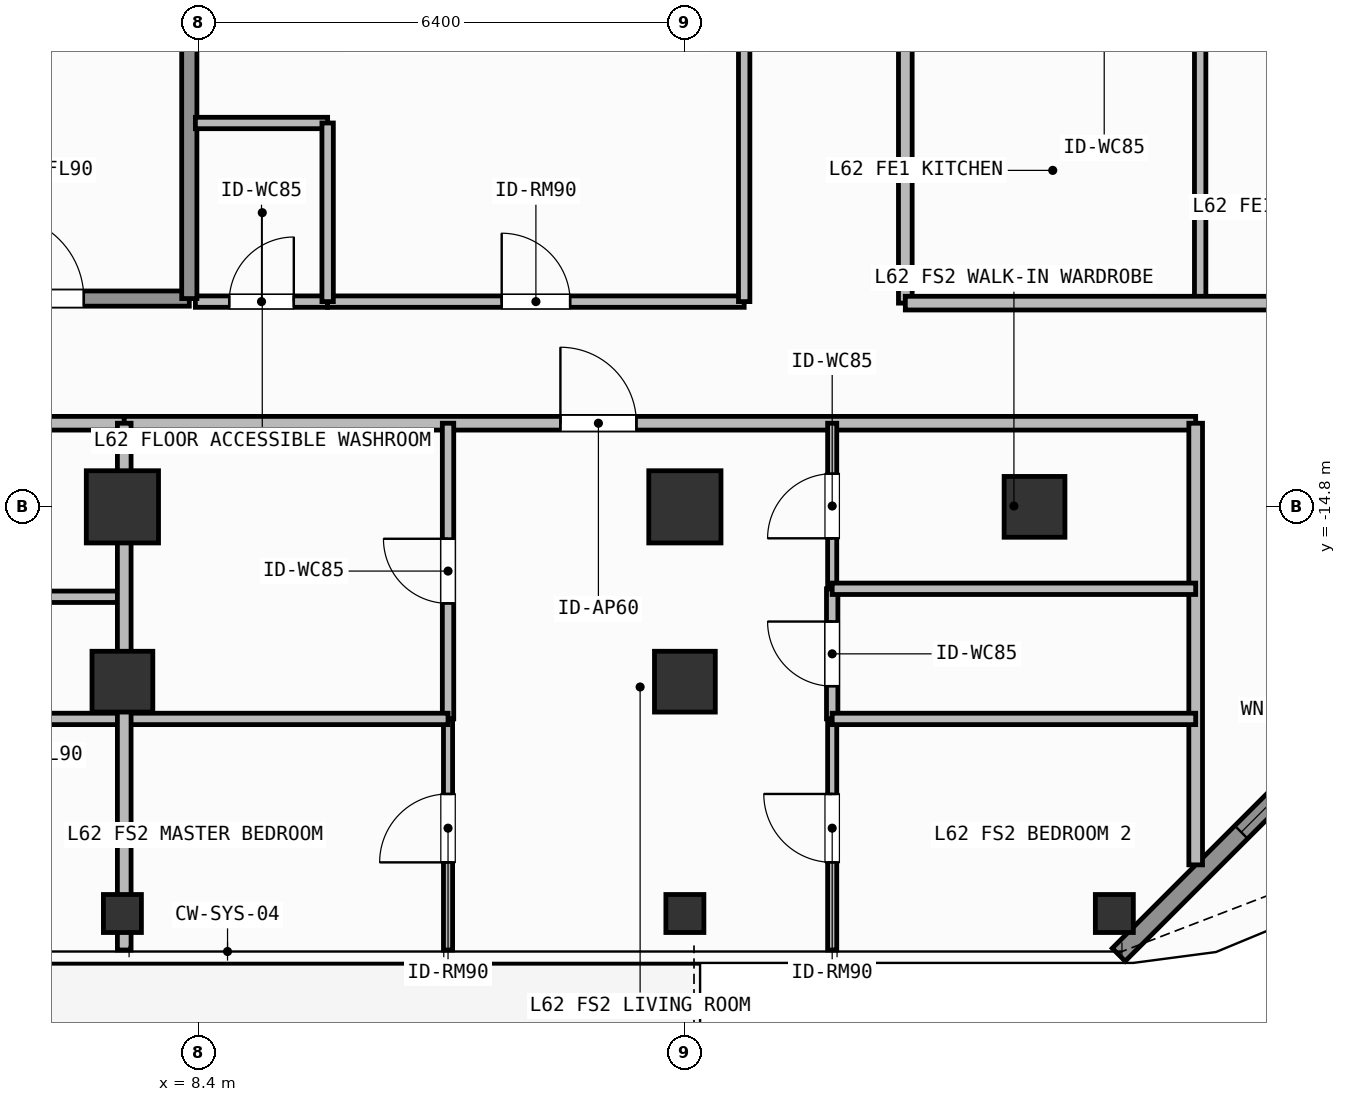
"""IFC4 building model, lengths in metres.
Left out: names, types, materials, properties, quantities, classifications, styles, units other than length and angle.
Written with IfcOpenShell. Run it as: python <this file> out.ifc"""

import sys

from ifc_helpers import new_model, si_unit, direction, frame, frame_2d, origin, origin_2d, place, context, subcontext, project, spatial, rectangle, hollow_rectangle, extrude, element, fill, save


model = new_model("IFC4")
c1 = context("Model", 3, precision=1e-05, world=origin(), true_north=direction((0.0, 1.0)))
c2 = subcontext(c1, "Body", "Model", "MODEL_VIEW")
j1 = project(units=[si_unit("LENGTHUNIT", "METRE"), si_unit("PLANEANGLEUNIT", "RADIAN")], contexts=[c1])
p1 = place(None, origin())
s1 = spatial("IfcSite", under=j1, at=p1, CompositionType="ELEMENT")
p2 = place(p1, origin())
s2 = spatial("IfcBuilding", under=s1, at=p2, CompositionType="ELEMENT")
p3 = place(p2, frame((0.0, 0.0, 254.7)))
s3 = spatial("IfcBuildingStorey", under=s2, at=p3, CompositionType="ELEMENT", Elevation=254.7)
for number, where, z_axis, x_axis in (
    (1, (7.4, -14.8, 0.0), (0.0, 0.0, 1.0), (1.0, 0.0, 0.0)),
    (2, (14.8, -14.8, 0.0), (0.0, 0.0, 1.0), (1.0, 0.0, 0.0)),
):
    element("IfcColumn", number, at=place(p3, frame(where, z_axis=z_axis, x_axis=x_axis)), inside=s3, PredefinedType="COLUMN", context=c2, shape_type="SweptSolid", body=[
        extrude(rectangle(XDim=0.95, YDim=0.95, at=origin_2d()), origin(), (0.0, 0.0, 1.0), 3.9),
    ])
for number, where, z_axis, x_axis in (
    (3, (19.4, -14.8, 0.0), (0.0, 0.0, 1.0), (1.0, 0.0, 0.0)),
    (4, (7.4, -17.1, 0.0), (0.0, 0.0, 1.0), (1.0, 0.0, 0.0)),
    (5, (14.8, -17.1, 0.0), (0.0, 0.0, 1.0), (1.0, 0.0, 0.0)),
):
    element("IfcColumn", number, at=place(p3, frame(where, z_axis=z_axis, x_axis=x_axis)), inside=s3, PredefinedType="COLUMN", context=c2, shape_type="SweptSolid", body=[
        extrude(hollow_rectangle(XDim=0.8, YDim=0.8, WallThickness=0.036, at=origin_2d()), origin(), (0.0, 0.0, 1.0), 3.9),
    ])
for number, where, z_axis, x_axis in (
    (6, (20.45, -20.15, 0.0), (0.0, 0.0, 1.0), (1.0, 0.0, 0.0)),
    (7, (7.4, -20.15, 0.0), (0.0, 0.0, 1.0), (1.0, 0.0, 0.0)),
    (8, (14.8, -20.15, 0.0), (0.0, 0.0, 1.0), (1.0, 0.0, 0.0)),
):
    element("IfcColumn", number, at=place(p3, frame(where, z_axis=z_axis, x_axis=x_axis)), inside=s3, PredefinedType="COLUMN", context=c2, shape_type="SweptSolid", body=[
        extrude(hollow_rectangle(XDim=0.5, YDim=0.5, WallThickness=0.025, at=origin_2d()), origin(), (0.0, 0.0, 1.0), 3.9),
    ])
p4 = place(p3, frame((24.792, -16.408, 0.0), z_axis=(0.0, 0.0, 1.0), x_axis=(-0.707126925818, -0.707086635981, 0.0)))
e9 = element("IfcWall", 9, at=p4, inside=s3, PredefinedType="SOLIDWALL", context=c2, shape_type="SweptSolid", body=[
    extrude(rectangle(XDim=6.06, YDim=0.24, at=frame_2d((3.03, 0.0))), origin(), (0.0, 0.0, 1.0), 3.68),
])
p5 = place(p4, frame((2.28, 0.0, 0.8)))
e10 = element("IfcOpeningElement", 10, at=p5, cuts=e9, PredefinedType="OPENING", context=c2, shape_type="SweptSolid", body=[
    extrude(rectangle(XDim=1.5, YDim=1.85, at=frame_2d((0.75, 0.925))), frame((0.0, 0.13, 0.0), z_axis=(0.0, -1.0, 0.0), x_axis=(1.0, 0.0, 0.0)), (0.0, 0.0, 1.0), 0.26),
])
p6 = place(p3, frame((4.58, -12.06, 0.0), z_axis=(0.0, 0.0, 1.0), x_axis=(1.0, 0.0, 0.0)))
e11 = element("IfcWall", 11, at=p6, inside=s3, PredefinedType="SOLIDWALL", context=c2, shape_type="SweptSolid", body=[
    extrude(rectangle(XDim=3.7, YDim=0.2, at=frame_2d((1.85, 0.0))), origin(), (0.0, 0.0, 1.0), 3.68),
])
p7 = place(p6, frame((1.212, 0.0, 0.0)))
e12 = element("IfcOpeningElement", 12, at=p7, cuts=e11, PredefinedType="OPENING", context=c2, shape_type="SweptSolid", body=[
    extrude(rectangle(XDim=1.1, YDim=2.15, at=frame_2d((0.55, 1.075))), frame((0.0, 0.11, 0.0), z_axis=(0.0, -1.0, 0.0), x_axis=(1.0, 0.0, 0.0)), (0.0, 0.0, 1.0), 0.22),
])
p8 = place(p3, frame((8.36, -12.1, 0.0), z_axis=(0.0, 0.0, 1.0), x_axis=(1.0, 0.0, 0.0)))
e13 = element("IfcWall", 13, at=p8, inside=s3, PredefinedType="PARTITIONING", context=c2, shape_type="SweptSolid", body=[
    extrude(rectangle(XDim=1.74, YDim=0.15, at=frame_2d((0.87, 0.0))), origin(), (0.0, 0.0, 1.0), 3.68),
])
p9 = place(p8, frame((0.445, 0.0, 0.0)))
e14 = element("IfcOpeningElement", 14, at=p9, cuts=e13, PredefinedType="OPENING", context=c2, shape_type="SweptSolid", body=[
    extrude(rectangle(XDim=0.85, YDim=2.1, at=frame_2d((0.425, 1.05))), frame((0.0, 0.085, 0.0), z_axis=(0.0, -1.0, 0.0), x_axis=(1.0, 0.0, 0.0)), (0.0, 0.0, 1.0), 0.17),
])
p10 = place(p3, frame((10.1, -12.1, 0.0), z_axis=(0.0, 0.0, 1.0), x_axis=(1.0, 0.0, 0.0)))
e15 = element("IfcWall", 15, at=p10, inside=s3, PredefinedType="PARTITIONING", context=c2, shape_type="SweptSolid", body=[
    extrude(rectangle(XDim=5.48, YDim=0.15, at=frame_2d((2.74, 0.0))), origin(), (0.0, 0.0, 1.0), 3.68),
])
p11 = place(p10, frame((2.29, 0.0, 0.0)))
e16 = element("IfcOpeningElement", 16, at=p11, cuts=e15, PredefinedType="OPENING", context=c2, shape_type="SweptSolid", body=[
    extrude(rectangle(XDim=0.9, YDim=2.1, at=frame_2d((0.45, 1.05))), frame((0.0, 0.085, 0.0), z_axis=(0.0, -1.0, 0.0), x_axis=(1.0, 0.0, 0.0)), (0.0, 0.0, 1.0), 0.17),
])
p12 = place(p3, frame((-13.72, -13.7, 0.0), z_axis=(0.0, 0.0, 1.0), x_axis=(1.0, 0.0, 0.0)))
e17 = element("IfcWall", 17, at=p12, inside=s3, PredefinedType="PARTITIONING", context=c2, shape_type="SweptSolid", body=[
    extrude(rectangle(XDim=21.144, YDim=0.18, at=frame_2d((10.572, 0.0))), origin(), (0.0, 0.0, 1.0), 3.68),
])
p13 = place(p12, frame((9.625, 0.0, 0.0)))
e18 = element("IfcOpeningElement", 18, at=p13, cuts=e17, PredefinedType="OPENING", context=c2, shape_type="SweptSolid", body=[
    extrude(rectangle(XDim=1.0, YDim=2.2, at=frame_2d((0.5, 1.1))), frame((0.0, 0.1, 0.0), z_axis=(0.0, -1.0, 0.0), x_axis=(1.0, 0.0, 0.0)), (0.0, 0.0, 1.0), 0.2),
])
p14 = place(p3, frame((7.424, -13.7, 0.0), z_axis=(0.0, 0.0, 1.0), x_axis=(1.0, 0.0, 0.0)))
e19 = element("IfcWall", 19, at=p14, inside=s3, PredefinedType="PARTITIONING", context=c2, shape_type="SweptSolid", body=[
    extrude(rectangle(XDim=14.096, YDim=0.18, at=frame_2d((7.048, 0.0))), origin(), (0.0, 0.0, 1.0), 3.68),
])
p15 = place(p14, frame((5.738, 0.0, 0.0)))
e20 = element("IfcOpeningElement", 20, at=p15, cuts=e19, PredefinedType="OPENING", context=c2, shape_type="SweptSolid", body=[
    extrude(rectangle(XDim=1.0, YDim=2.2, at=frame_2d((0.5, 1.1))), frame((0.0, 0.1, 0.0), z_axis=(0.0, -1.0, 0.0), x_axis=(1.0, 0.0, 0.0)), (0.0, 0.0, 1.0), 0.2),
])
p16 = place(p3, frame((11.684, -17.59, 0.0), z_axis=(0.0, 0.0, 1.0), x_axis=(0.0, 1.0, 0.0)))
e21 = element("IfcWall", 21, at=p16, inside=s3, PredefinedType="PARTITIONING", context=c2, shape_type="SweptSolid", body=[
    extrude(rectangle(XDim=3.89, YDim=0.15, at=frame_2d((1.945, 0.0))), origin(), (0.0, 0.0, 1.0), 3.68),
])
p17 = place(p16, frame((1.52, 0.0, 0.0)))
e22 = element("IfcOpeningElement", 22, at=p17, cuts=e21, PredefinedType="OPENING", context=c2, shape_type="SweptSolid", body=[
    extrude(rectangle(XDim=0.85, YDim=2.1, at=frame_2d((0.425, 1.05))), frame((0.0, 0.085, 0.0), z_axis=(0.0, -1.0, 0.0), x_axis=(1.0, 0.0, 0.0)), (0.0, 0.0, 1.0), 0.17),
])
p18 = place(p3, frame((11.684, -20.63, 0.0), z_axis=(0.0, 0.0, 1.0), x_axis=(0.0, 1.0, 0.0)))
e23 = element("IfcWall", 23, at=p18, inside=s3, PredefinedType="PARTITIONING", context=c2, shape_type="SweptSolid", body=[
    extrude(rectangle(XDim=3.04, YDim=0.12, at=frame_2d((1.52, 0.0))), origin(), (0.0, 0.0, 1.0), 3.68),
])
p19 = place(p18, frame((1.153, 0.0, 0.0)))
e24 = element("IfcOpeningElement", 24, at=p19, cuts=e23, PredefinedType="OPENING", context=c2, shape_type="SweptSolid", body=[
    extrude(rectangle(XDim=0.9, YDim=2.1, at=frame_2d((0.45, 1.05))), frame((0.0, 0.07, 0.0), z_axis=(0.0, -1.0, 0.0), x_axis=(1.0, 0.0, 0.0)), (0.0, 0.0, 1.0), 0.14),
])
p20 = place(p3, frame((16.738, -17.59, 0.0), z_axis=(0.0, 0.0, 1.0), x_axis=(0.0, 1.0, 0.0)))
e25 = element("IfcWall", 25, at=p20, inside=s3, PredefinedType="PARTITIONING", context=c2, shape_type="SweptSolid", body=[
    extrude(rectangle(XDim=1.712, YDim=0.15, at=frame_2d((0.856, 0.0))), origin(), (0.0, 0.0, 1.0), 3.68),
])
p21 = place(p20, frame((0.431, 0.0, 0.0)))
e26 = element("IfcOpeningElement", 26, at=p21, cuts=e25, PredefinedType="OPENING", context=c2, shape_type="SweptSolid", body=[
    extrude(rectangle(XDim=0.85, YDim=2.1, at=frame_2d((0.425, 1.05))), frame((0.0, 0.085, 0.0), z_axis=(0.0, -1.0, 0.0), x_axis=(1.0, 0.0, 0.0)), (0.0, 0.0, 1.0), 0.17),
])
p22 = place(p3, frame((16.738, -15.878, 0.0), z_axis=(0.0, 0.0, 1.0), x_axis=(0.0, 1.0, 0.0)))
e27 = element("IfcWall", 27, at=p22, inside=s3, PredefinedType="PARTITIONING", context=c2, shape_type="SweptSolid", body=[
    extrude(rectangle(XDim=2.178, YDim=0.12, at=frame_2d((1.089, 0.0))), origin(), (0.0, 0.0, 1.0), 3.68),
])
p23 = place(p22, frame((0.664, 0.0, 0.0)))
e28 = element("IfcOpeningElement", 28, at=p23, cuts=e27, PredefinedType="OPENING", context=c2, shape_type="SweptSolid", body=[
    extrude(rectangle(XDim=0.85, YDim=2.1, at=frame_2d((0.425, 1.05))), frame((0.0, 0.07, 0.0), z_axis=(0.0, -1.0, 0.0), x_axis=(1.0, 0.0, 0.0)), (0.0, 0.0, 1.0), 0.14),
])
p24 = place(p3, frame((16.738, -20.63, 0.0), z_axis=(0.0, 0.0, 1.0), x_axis=(0.0, 1.0, 0.0)))
e29 = element("IfcWall", 29, at=p24, inside=s3, PredefinedType="PARTITIONING", context=c2, shape_type="SweptSolid", body=[
    extrude(rectangle(XDim=3.04, YDim=0.12, at=frame_2d((1.52, 0.0))), origin(), (0.0, 0.0, 1.0), 3.68),
])
p25 = place(p24, frame((1.153, 0.0, 0.0)))
e30 = element("IfcOpeningElement", 30, at=p25, cuts=e29, PredefinedType="OPENING", context=c2, shape_type="SweptSolid", body=[
    extrude(rectangle(XDim=0.9, YDim=2.1, at=frame_2d((0.45, 1.05))), frame((0.0, 0.07, 0.0), z_axis=(0.0, -1.0, 0.0), x_axis=(1.0, 0.0, 0.0)), (0.0, 0.0, 1.0), 0.14),
])
p26 = place(p3, frame((17.7, -12.12, 0.0), z_axis=(0.0, 0.0, 1.0), x_axis=(0.0, 1.0, 0.0)))
e31 = element("IfcWall", 31, at=p26, inside=s3, PredefinedType="PARTITIONING", context=c2, shape_type="SweptSolid", body=[
    extrude(rectangle(XDim=13.574, YDim=0.18, at=frame_2d((6.787, 0.0))), origin(), (0.0, 0.0, 1.0), 3.68),
])
p27 = place(p26, frame((5.665, 0.0, 0.0)))
e32 = element("IfcOpeningElement", 32, at=p27, cuts=e31, PredefinedType="OPENING", context=c2, shape_type="SweptSolid", body=[
    extrude(rectangle(XDim=1.0, YDim=2.2, at=frame_2d((0.5, 1.1))), frame((0.0, 0.1, 0.0), z_axis=(0.0, -1.0, 0.0), x_axis=(1.0, 0.0, 0.0)), (0.0, 0.0, 1.0), 0.2),
])
p28 = place(p3, frame((8.28, -12.06, 0.0), z_axis=(0.0, 0.0, 1.0), x_axis=(0.0, 1.0, 0.0)))
e33 = element("IfcWall", 33, at=p28, inside=s3, PredefinedType="SOLIDWALL", context=c2, shape_type="SweptSolid", body=[
    extrude(rectangle(XDim=3.335, YDim=0.2, at=frame_2d((1.667, 0.0))), origin(), (0.0, 0.0, 1.0), 3.68),
])
p29 = place(p3, frame((8.36, -9.75, 0.0), z_axis=(0.0, 0.0, 1.0), x_axis=(1.0, 0.0, 0.0)))
e34 = element("IfcWall", 34, at=p29, inside=s3, PredefinedType="PARTITIONING", context=c2, shape_type="SweptSolid", body=[
    extrude(rectangle(XDim=1.74, YDim=0.15, at=frame_2d((0.87, 0.0))), origin(), (0.0, 0.0, 1.0), 3.68),
])
p30 = place(p3, frame((10.1, -12.1, 0.0), z_axis=(0.0, 0.0, 1.0), x_axis=(0.0, 1.0, 0.0)))
e35 = element("IfcWall", 35, at=p30, inside=s3, PredefinedType="PARTITIONING", context=c2, shape_type="SweptSolid", body=[
    extrude(rectangle(XDim=2.35, YDim=0.15, at=frame_2d((1.175, 0.0))), origin(), (0.0, 0.0, 1.0), 3.68),
])
p31 = place(p3, frame((15.58, -12.1, 0.0), z_axis=(0.0, 0.0, 1.0), x_axis=(0.0, 1.0, 0.0)))
e36 = element("IfcWall", 36, at=p31, inside=s3, PredefinedType="PARTITIONING", context=c2, shape_type="SweptSolid", body=[
    extrude(rectangle(XDim=6.25, YDim=0.15, at=frame_2d((3.125, 0.0))), origin(), (0.0, 0.0, 1.0), 3.68),
])
p32 = place(p3, frame((21.52, -19.51, 0.0), z_axis=(0.0, 0.0, 1.0), x_axis=(0.0, 1.0, 0.0)))
e37 = element("IfcWall", 37, at=p32, inside=s3, PredefinedType="PARTITIONING", context=c2, shape_type="SweptSolid", body=[
    extrude(rectangle(XDim=5.81, YDim=0.18, at=frame_2d((2.905, 0.0))), origin(), (0.0, 0.0, 1.0), 3.68),
])
for number, where, z_axis, x_axis in (
    (38, (1.983, -15.983, 0.0), (0.0, 0.0, 1.0), (1.0, 0.0, 0.0)),
    (39, (1.983, -17.59, 0.0), (0.0, 0.0, 1.0), (1.0, 0.0, 0.0)),
):
    element("IfcWall", number, at=place(p3, frame(where, z_axis=z_axis, x_axis=x_axis)), inside=s3, PredefinedType="PARTITIONING", context=c2, shape_type="SweptSolid", body=[
        extrude(rectangle(XDim=5.441, YDim=0.15, at=frame_2d((2.721, 0.0))), origin(), (0.0, 0.0, 1.0), 3.68),
    ])
p33 = place(p3, frame((7.424, -17.59, 0.0), z_axis=(0.0, 0.0, 1.0), x_axis=(1.0, 0.0, 0.0)))
e40 = element("IfcWall", 40, at=p33, inside=s3, PredefinedType="PARTITIONING", context=c2, shape_type="SweptSolid", body=[
    extrude(rectangle(XDim=4.26, YDim=0.15, at=frame_2d((2.13, 0.0))), origin(), (0.0, 0.0, 1.0), 3.68),
])
for number, where, z_axis, x_axis in (
    (41, (16.738, -15.878, 0.0), (0.0, 0.0, 1.0), (1.0, 0.0, 0.0)),
    (42, (16.738, -17.59, 0.0), (0.0, 0.0, 1.0), (1.0, 0.0, 0.0)),
):
    element("IfcWall", number, at=place(p3, frame(where, z_axis=z_axis, x_axis=x_axis)), inside=s3, PredefinedType="PARTITIONING", context=c2, shape_type="SweptSolid", body=[
        extrude(rectangle(XDim=4.782, YDim=0.15, at=frame_2d((2.391, 0.0))), origin(), (0.0, 0.0, 1.0), 3.68),
    ])
p34 = place(p3, frame((7.424, -20.63, 0.0), z_axis=(0.0, 0.0, 1.0), x_axis=(0.0, 1.0, 0.0)))
e43 = element("IfcWall", 43, at=p34, inside=s3, PredefinedType="PARTITIONING", context=c2, shape_type="SweptSolid", body=[
    extrude(rectangle(XDim=6.93, YDim=0.18, at=frame_2d((3.465, 0.0))), origin(), (0.0, 0.0, 1.0), 3.182),
])
p35 = place(p3, frame((21.579, -12.12, 0.0), z_axis=(0.0, 0.0, 1.0), x_axis=(0.0, 1.0, 0.0)))
e44 = element("IfcWall", 44, at=p35, inside=s3, PredefinedType="PARTITIONING", context=c2, shape_type="SweptSolid", body=[
    extrude(rectangle(XDim=3.493, YDim=0.15, at=frame_2d((1.747, 0.0))), origin(), (0.0, 0.0, 1.0), 3.68),
])
p36 = place(p3, frame((17.7, -12.12, 0.0), z_axis=(0.0, 0.0, 1.0), x_axis=(1.0, 0.0, 0.0)))
e45 = element("IfcWall", 45, at=p36, inside=s3, PredefinedType="PARTITIONING", context=c2, shape_type="SweptSolid", body=[
    extrude(rectangle(XDim=7.03, YDim=0.18, at=frame_2d((3.515, 0.0))), origin(), (0.0, 0.0, 1.0), 3.68),
])
p37 = place(p5, origin())
e46 = element("IfcWindow", 46, at=p37, inside=s3, PartitioningType="SINGLE_PANEL", PredefinedType="WINDOW", context=c2, shape_type="SweptSolid", body=[
    extrude(rectangle(XDim=1.5, YDim=1.85, at=frame_2d((0.75, 0.925))), frame((0.0, 0.03, 0.0), z_axis=(0.0, -1.0, 0.0), x_axis=(1.0, 0.0, 0.0)), (0.0, 0.0, 1.0), 0.06),
])
fill(e10, e46)
p38 = place(p7, origin())
e47 = element("IfcDoor", 47, at=p38, inside=s3, OperationType="SINGLE_SWING_LEFT", PredefinedType="DOOR", context=c2, shape_type="SweptSolid", body=[
    extrude(rectangle(XDim=1.1, YDim=2.15, at=frame_2d((0.55, 1.075))), frame((0.0, 0.025, 0.0), z_axis=(0.0, -1.0, 0.0), x_axis=(1.0, 0.0, 0.0)), (0.0, 0.0, 1.0), 0.05),
])
fill(e12, e47)
p39 = place(p9, origin())
e48 = element("IfcDoor", 48, at=p39, inside=s3, OperationType="SINGLE_SWING_RIGHT", PredefinedType="DOOR", context=c2, shape_type="SweptSolid", body=[
    extrude(rectangle(XDim=0.85, YDim=2.1, at=frame_2d((0.425, 1.05))), frame((0.0, 0.025, 0.0), z_axis=(0.0, -1.0, 0.0), x_axis=(1.0, 0.0, 0.0)), (0.0, 0.0, 1.0), 0.05),
])
fill(e14, e48)
p40 = place(p11, origin())
e49 = element("IfcDoor", 49, at=p40, inside=s3, OperationType="SINGLE_SWING_LEFT", PredefinedType="DOOR", context=c2, shape_type="SweptSolid", body=[
    extrude(rectangle(XDim=0.9, YDim=2.1, at=frame_2d((0.45, 1.05))), frame((0.0, 0.025, 0.0), z_axis=(0.0, -1.0, 0.0), x_axis=(1.0, 0.0, 0.0)), (0.0, 0.0, 1.0), 0.05),
])
fill(e16, e49)
p41 = place(p15, origin())
e50 = element("IfcDoor", 50, at=p41, inside=s3, OperationType="SINGLE_SWING_LEFT", PredefinedType="DOOR", context=c2, shape_type="SweptSolid", body=[
    extrude(rectangle(XDim=1.0, YDim=2.2, at=frame_2d((0.5, 1.1))), frame((0.0, 0.025, 0.0), z_axis=(0.0, -1.0, 0.0), x_axis=(1.0, 0.0, 0.0)), (0.0, 0.0, 1.0), 0.05),
])
fill(e20, e50)
p42 = place(p17, origin())
e51 = element("IfcDoor", 51, at=p42, inside=s3, OperationType="SINGLE_SWING_RIGHT", PredefinedType="DOOR", context=c2, shape_type="SweptSolid", body=[
    extrude(rectangle(XDim=0.85, YDim=2.1, at=frame_2d((0.425, 1.05))), frame((0.0, 0.025, 0.0), z_axis=(0.0, -1.0, 0.0), x_axis=(1.0, 0.0, 0.0)), (0.0, 0.0, 1.0), 0.05),
])
fill(e22, e51)
p43 = place(p19, origin())
e52 = element("IfcDoor", 52, at=p43, inside=s3, OperationType="SINGLE_SWING_LEFT", PredefinedType="DOOR", context=c2, shape_type="SweptSolid", body=[
    extrude(rectangle(XDim=0.9, YDim=2.1, at=frame_2d((0.45, 1.05))), frame((0.0, 0.025, 0.0), z_axis=(0.0, -1.0, 0.0), x_axis=(1.0, 0.0, 0.0)), (0.0, 0.0, 1.0), 0.05),
])
fill(e24, e52)
p44 = place(p21, origin())
e53 = element("IfcDoor", 53, at=p44, inside=s3, OperationType="SINGLE_SWING_RIGHT", PredefinedType="DOOR", context=c2, shape_type="SweptSolid", body=[
    extrude(rectangle(XDim=0.85, YDim=2.1, at=frame_2d((0.425, 1.05))), frame((0.0, 0.025, 0.0), z_axis=(0.0, -1.0, 0.0), x_axis=(1.0, 0.0, 0.0)), (0.0, 0.0, 1.0), 0.05),
])
fill(e26, e53)
p45 = place(p23, origin())
e54 = element("IfcDoor", 54, at=p45, inside=s3, OperationType="SINGLE_SWING_LEFT", PredefinedType="DOOR", context=c2, shape_type="SweptSolid", body=[
    extrude(rectangle(XDim=0.85, YDim=2.1, at=frame_2d((0.425, 1.05))), frame((0.0, 0.025, 0.0), z_axis=(0.0, -1.0, 0.0), x_axis=(1.0, 0.0, 0.0)), (0.0, 0.0, 1.0), 0.05),
])
fill(e28, e54)
p46 = place(p25, origin())
e55 = element("IfcDoor", 55, at=p46, inside=s3, OperationType="SINGLE_SWING_RIGHT", PredefinedType="DOOR", context=c2, shape_type="SweptSolid", body=[
    extrude(rectangle(XDim=0.9, YDim=2.1, at=frame_2d((0.45, 1.05))), frame((0.0, 0.025, 0.0), z_axis=(0.0, -1.0, 0.0), x_axis=(1.0, 0.0, 0.0)), (0.0, 0.0, 1.0), 0.05),
])
fill(e30, e55)
save(model, sys.argv[1])
